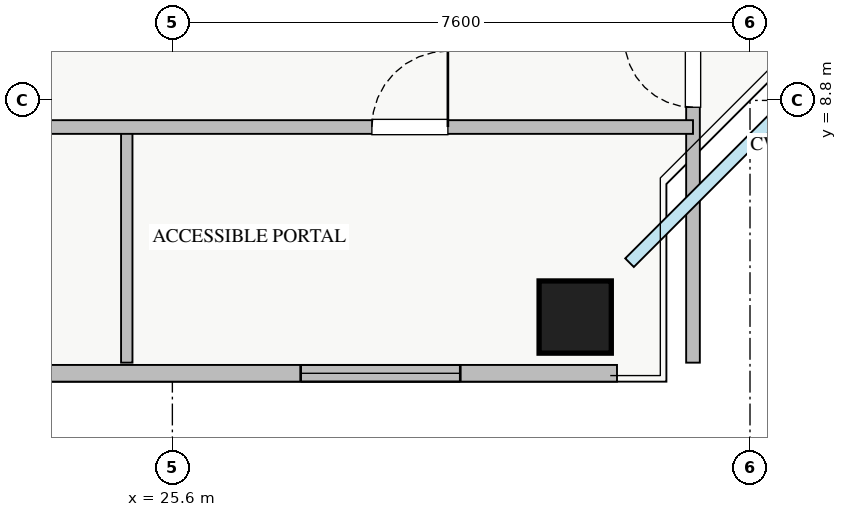
"""IFC4 building model, lengths in metres.
Left out: names, types, materials, properties, quantities, classifications, styles, units other than length and angle.
Written with IfcOpenShell. Run it as: python <this file> out.ifc"""

import sys

from ifc_helpers import new_model, si_unit, direction, frame, frame_2d, origin, origin_2d, place, context, subcontext, project, spatial, rectangle, extrude, source, transform, mapped, element, fill, save


model = new_model("IFC4")
c1 = context("Model", 3, precision=1e-05, world=origin(), true_north=direction((0.0, 1.0)))
c2 = subcontext(c1, "Body", "Model", "MODEL_VIEW")
j1 = project(units=[si_unit("LENGTHUNIT", "METRE"), si_unit("PLANEANGLEUNIT", "RADIAN")], contexts=[c1])
p1 = place(None, origin())
s1 = spatial("IfcSite", under=j1, at=p1, CompositionType="ELEMENT")
p2 = place(p1, origin())
s2 = spatial("IfcBuilding", under=s1, at=p2, CompositionType="ELEMENT")
p3 = place(p2, frame((0.0, 0.0, 160.0)))
s3 = spatial("IfcBuildingStorey", under=s2, at=p3, CompositionType="ELEMENT", Elevation=160.0)
m1 = source(origin(), c2, "Body", "SweptSolid", [
    extrude(rectangle(XDim=0.95, YDim=0.95, at=origin_2d()), origin(), (0.0, 0.0, 1.0), 3.25),
])
p4 = place(p3, frame((30.9, 5.95, 0.0), z_axis=(0.0, 0.0, 1.0), x_axis=(1.0, 0.0, 0.0)))
e1 = element("IfcColumn", 1, at=p4, inside=s3, PredefinedType="COLUMN", context=c2, shape_type="MappedRepresentation", body=[
    mapped(m1, transform((0.0, 0.0, 0.0), x_axis=(1.0, 0.0, 0.0), y_axis=(0.0, 1.0, 0.0), z_axis=(0.0, 0.0, 1.0), scale=1.0)),
])
p5 = place(p3, frame((6.55, 5.21, 0.0), z_axis=(0.0, 0.0, 1.0), x_axis=(1.0, 0.0, 0.0)))
e2 = element("IfcWall", 2, at=p5, inside=s3, PredefinedType="STANDARD", context=c2, shape_type="SweptSolid", body=[
    extrude(rectangle(XDim=24.9, YDim=0.22, at=frame_2d((12.45, 0.0))), origin(), (0.0, 0.0, 1.0), 2.61),
])
p6 = place(p5, frame((0.3, 0.0, 0.9)))
e3 = element("IfcOpeningElement", 3, at=p6, cuts=e2, PredefinedType="OPENING", context=c2, shape_type="SweptSolid", body=[
    extrude(rectangle(XDim=1.5, YDim=1.5, at=frame_2d((0.75, 0.75))), frame((0.0, 0.12, 0.0), z_axis=(0.0, -1.0, 0.0), x_axis=(1.0, 0.0, 0.0)), (0.0, 0.0, 1.0), 0.24),
])
p7 = place(p5, frame((7.304, 0.0, 0.9)))
e4 = element("IfcOpeningElement", 4, at=p7, cuts=e2, PredefinedType="OPENING", context=c2, shape_type="SweptSolid", body=[
    extrude(rectangle(XDim=1.8, YDim=1.5, at=frame_2d((0.9, 0.75))), frame((0.0, 0.12, 0.0), z_axis=(0.0, -1.0, 0.0), x_axis=(1.0, 0.0, 0.0)), (0.0, 0.0, 1.0), 0.24),
])
p8 = place(p5, frame((14.813, 0.0, 0.9)))
e5 = element("IfcOpeningElement", 5, at=p8, cuts=e2, PredefinedType="OPENING", context=c2, shape_type="SweptSolid", body=[
    extrude(rectangle(XDim=1.5, YDim=1.45, at=frame_2d((0.75, 0.725))), frame((0.0, 0.12, 0.0), z_axis=(0.0, -1.0, 0.0), x_axis=(1.0, 0.0, 0.0)), (0.0, 0.0, 1.0), 0.24),
])
p9 = place(p5, frame((20.738, 0.0, 0.9)))
e6 = element("IfcOpeningElement", 6, at=p9, cuts=e2, PredefinedType="OPENING", context=c2, shape_type="SweptSolid", body=[
    extrude(rectangle(XDim=2.1, YDim=1.48, at=frame_2d((1.05, 0.74))), frame((0.0, 0.12, 0.0), z_axis=(0.0, -1.0, 0.0), x_axis=(1.0, 0.0, 0.0)), (0.0, 0.0, 1.0), 0.24),
])
p10 = place(p5, frame((4.094, 0.0, 0.9)))
e7 = element("IfcOpeningElement", 7, at=p10, cuts=e2, PredefinedType="OPENING", context=c2, shape_type="SweptSolid", body=[
    extrude(rectangle(XDim=2.4, YDim=1.5, at=frame_2d((1.2, 0.75))), frame((0.0, 0.12, 0.0), z_axis=(0.0, -1.0, 0.0), x_axis=(1.0, 0.0, 0.0)), (0.0, 0.0, 1.0), 0.24),
])
p11 = place(p3, frame((32.45, 5.35, 0.0), z_axis=(0.0, 0.0, 1.0), x_axis=(0.0, 1.0, 0.0)))
e8 = element("IfcWall", 8, at=p11, inside=s3, PredefinedType="PARTITIONING", context=c2, shape_type="SweptSolid", body=[
    extrude(rectangle(XDim=11.35, YDim=0.18, at=frame_2d((5.675, 0.0))), origin(), (0.0, 0.0, 1.0), 3.07),
])
p12 = place(p11, frame((3.36, 0.0, 0.0)))
e9 = element("IfcOpeningElement", 9, at=p12, cuts=e8, PredefinedType="OPENING", context=c2, shape_type="SweptSolid", body=[
    extrude(rectangle(XDim=0.9, YDim=2.05, at=frame_2d((0.45, 1.025))), frame((0.0, 0.1, 0.0), z_axis=(0.0, -1.0, 0.0), x_axis=(1.0, 0.0, 0.0)), (0.0, 0.0, 1.0), 0.2),
])
p13 = place(p11, frame((5.785, 0.0, 0.0)))
e10 = element("IfcOpeningElement", 10, at=p13, cuts=e8, PredefinedType="OPENING", context=c2, shape_type="SweptSolid", body=[
    extrude(rectangle(XDim=1.0, YDim=2.05, at=frame_2d((0.5, 1.025))), frame((0.0, 0.1, 0.0), z_axis=(0.0, -1.0, 0.0), x_axis=(1.0, 0.0, 0.0)), (0.0, 0.0, 1.0), 0.2),
])
p14 = place(p3, frame((25.0, 5.35, 0.0), z_axis=(0.0, 0.0, 1.0), x_axis=(0.0, 1.0, 0.0)))
e11 = element("IfcWall", 11, at=p14, inside=s3, PredefinedType="PARTITIONING", context=c2, shape_type="SweptSolid", body=[
    extrude(rectangle(XDim=3.1, YDim=0.15, at=frame_2d((1.55, 0.0))), origin(), (0.0, 0.0, 1.0), 3.07),
])
p15 = place(p3, frame((8.65, 8.45, 0.0), z_axis=(0.0, 0.0, 1.0), x_axis=(1.0, 0.0, 0.0)))
e12 = element("IfcWall", 12, at=p15, inside=s3, PredefinedType="PARTITIONING", context=c2, shape_type="SweptSolid", body=[
    extrude(rectangle(XDim=23.8, YDim=0.18, at=frame_2d((11.9, 0.0))), origin(), (0.0, 0.0, 1.0), 3.07),
])
p16 = place(p15, frame((3.425, 0.0, 0.0)))
e13 = element("IfcOpeningElement", 13, at=p16, cuts=e12, PredefinedType="OPENING", context=c2, shape_type="SweptSolid", body=[
    extrude(rectangle(XDim=1.0, YDim=2.05, at=frame_2d((0.5, 1.025))), frame((0.0, 0.1, 0.0), z_axis=(0.0, -1.0, 0.0), x_axis=(1.0, 0.0, 0.0)), (0.0, 0.0, 1.0), 0.2),
])
p17 = place(p15, frame((11.6, 0.0, 0.0)))
e14 = element("IfcOpeningElement", 14, at=p17, cuts=e12, PredefinedType="OPENING", context=c2, shape_type="SweptSolid", body=[
    extrude(rectangle(XDim=1.0, YDim=2.05, at=frame_2d((0.5, 1.025))), frame((0.0, 0.1, 0.0), z_axis=(0.0, -1.0, 0.0), x_axis=(1.0, 0.0, 0.0)), (0.0, 0.0, 1.0), 0.2),
])
p18 = place(p15, frame((19.575, 0.0, 0.0)))
e15 = element("IfcOpeningElement", 15, at=p18, cuts=e12, PredefinedType="OPENING", context=c2, shape_type="SweptSolid", body=[
    extrude(rectangle(XDim=1.0, YDim=2.05, at=frame_2d((0.5, 1.025))), frame((0.0, 0.1, 0.0), z_axis=(0.0, -1.0, 0.0), x_axis=(1.0, 0.0, 0.0)), (0.0, 0.0, 1.0), 0.2),
])
m2 = source(origin(), c2, "Body", "SweptSolid", [
    extrude(rectangle(XDim=2.1, YDim=1.48, at=frame_2d((1.05, 0.74))), frame((0.0, 0.03, 0.0), z_axis=(0.0, -1.0, 0.0), x_axis=(1.0, 0.0, 0.0)), (0.0, 0.0, 1.0), 0.06),
])
p19 = place(p9, origin())
e16 = element("IfcWindow", 16, at=p19, inside=s3, PartitioningType="TRIPLE_PANEL_VERTICAL", PredefinedType="WINDOW", context=c2, shape_type="MappedRepresentation", body=[
    mapped(m2, transform((0.0, 0.0, 0.0), x_axis=(1.0, 0.0, 0.0), y_axis=(0.0, 1.0, 0.0), z_axis=(0.0, 0.0, 1.0), scale=1.0)),
])
fill(e6, e16)
m3 = source(origin(), c2, "Body", "SweptSolid", [
    extrude(rectangle(XDim=0.9, YDim=2.05, at=frame_2d((0.45, 1.025))), frame((0.0, 0.025, 0.0), z_axis=(0.0, -1.0, 0.0), x_axis=(1.0, 0.0, 0.0)), (0.0, 0.0, 1.0), 0.05),
])
p20 = place(p12, origin())
e17 = element("IfcDoor", 17, at=p20, inside=s3, OperationType="SINGLE_SWING_RIGHT", PredefinedType="DOOR", context=c2, shape_type="MappedRepresentation", body=[
    mapped(m3, transform((0.0, 0.0, 0.0), x_axis=(1.0, 0.0, 0.0), y_axis=(0.0, 1.0, 0.0), z_axis=(0.0, 0.0, 1.0), scale=1.0)),
])
fill(e9, e17)
m4 = source(origin(), c2, "Body", "SweptSolid", [
    extrude(rectangle(XDim=1.0, YDim=2.05, at=frame_2d((0.5, 1.025))), frame((0.0, 0.025, 0.0), z_axis=(0.0, -1.0, 0.0), x_axis=(1.0, 0.0, 0.0)), (0.0, 0.0, 1.0), 0.05),
])
p21 = place(p18, origin())
e18 = element("IfcDoor", 18, at=p21, inside=s3, OperationType="SINGLE_SWING_RIGHT", PredefinedType="DOOR", context=c2, shape_type="MappedRepresentation", body=[
    mapped(m4, transform((0.0, 0.0, 0.0), x_axis=(1.0, 0.0, 0.0), y_axis=(0.0, 1.0, 0.0), z_axis=(0.0, 0.0, 1.0), scale=1.0)),
])
fill(e15, e18)
save(model, sys.argv[1])
